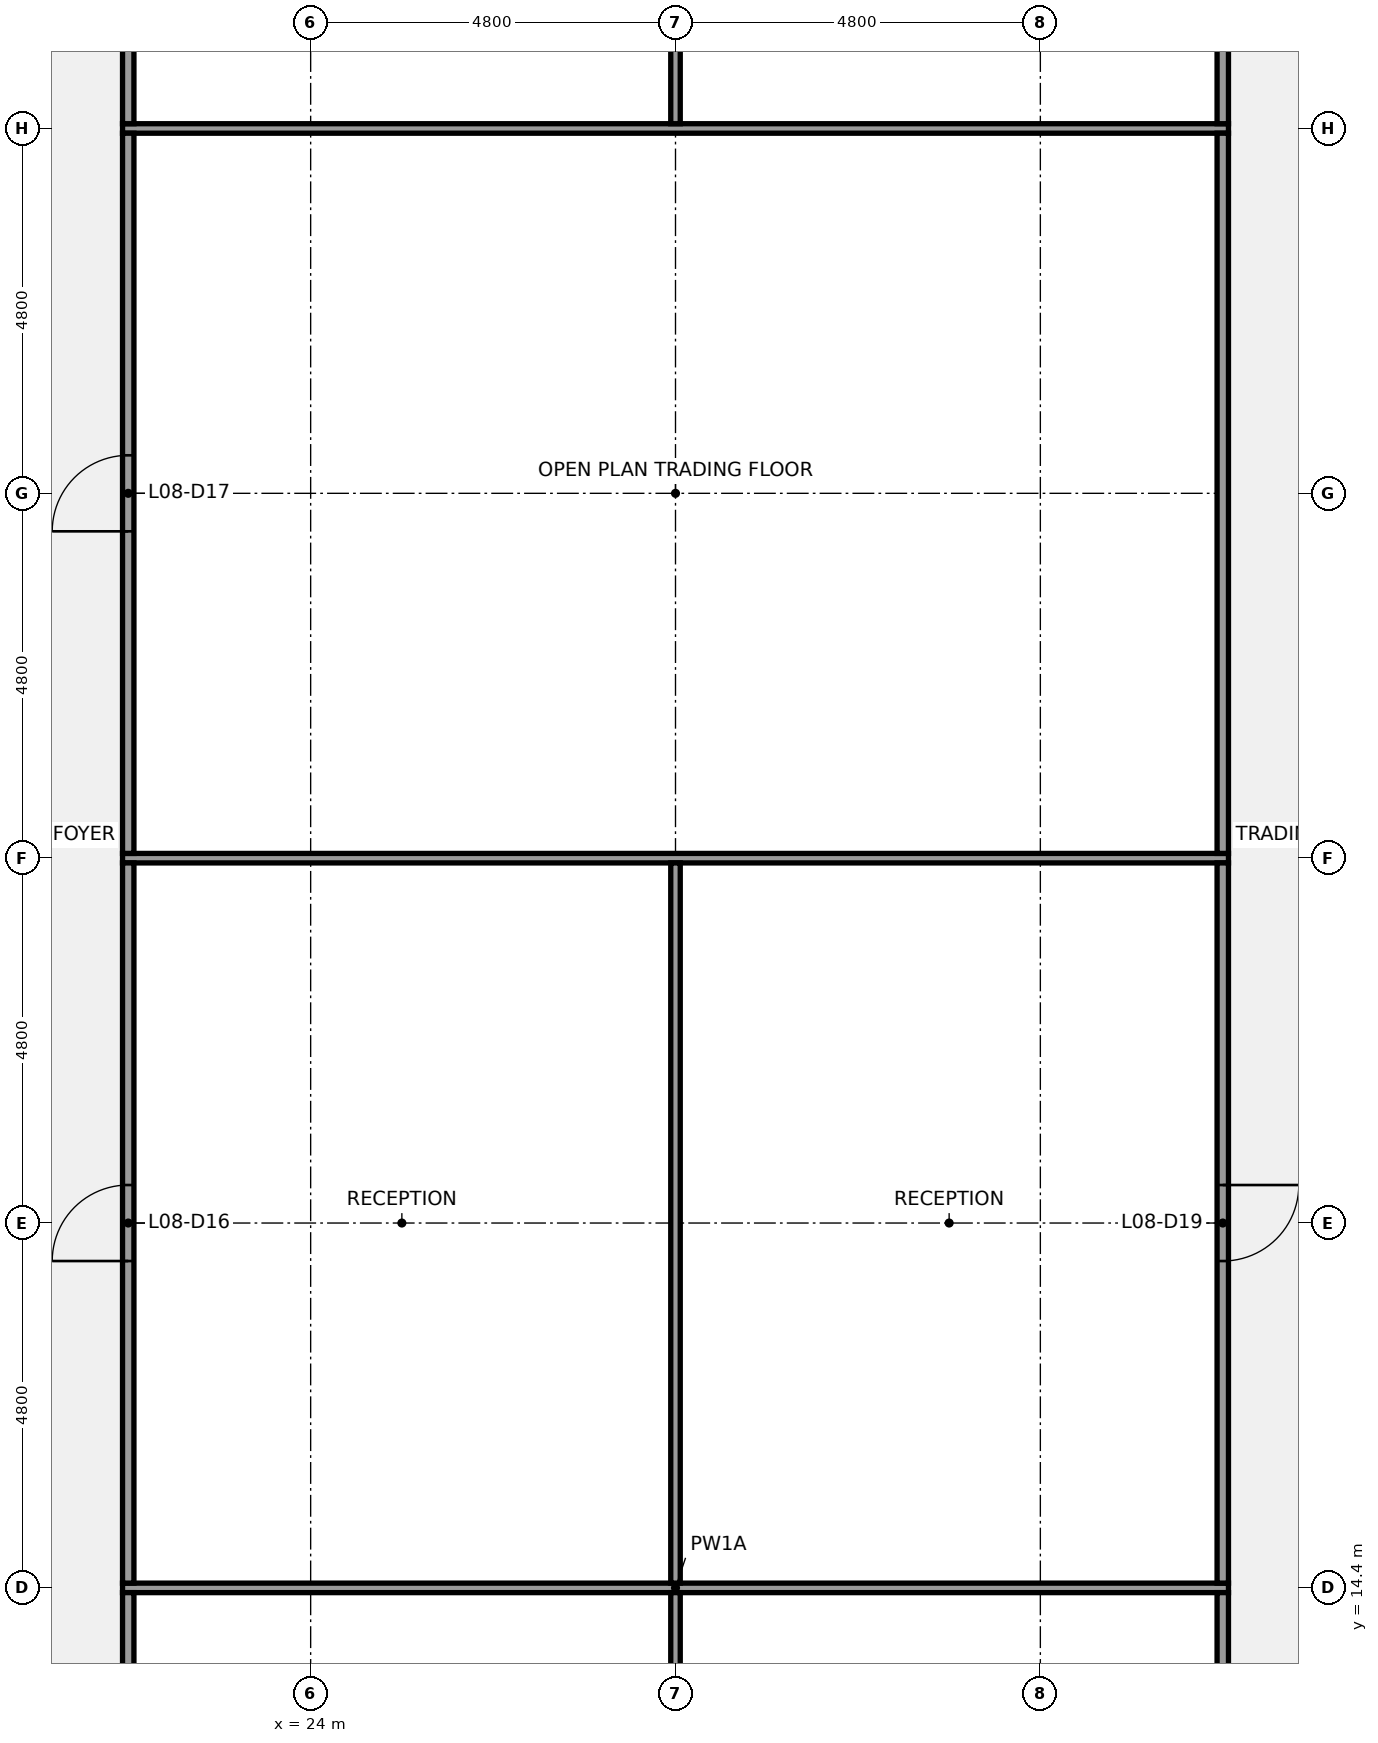
"""IFC4 building model, lengths in metres.
Left out: names, types, materials, properties, quantities, classifications, styles, units other than length and angle.
Written with IfcOpenShell. Run it as: python <this file> out.ifc"""

import sys

from ifc_helpers import new_model, si_unit, direction, frame, frame_2d, origin, place, context, subcontext, project, spatial, rectangle, extrude, element, fill, save


model = new_model("IFC4")
c1 = context("Model", 3, precision=1e-05, world=origin(), true_north=direction((0.0, 1.0)))
c2 = subcontext(c1, "Body", "Model", "MODEL_VIEW")
j1 = project(units=[si_unit("LENGTHUNIT", "METRE"), si_unit("PLANEANGLEUNIT", "RADIAN")], contexts=[c1])
p1 = place(None, origin())
s1 = spatial("IfcSite", under=j1, at=p1, CompositionType="ELEMENT")
p2 = place(p1, origin())
s2 = spatial("IfcBuilding", under=s1, at=p2, CompositionType="ELEMENT")
p3 = place(p2, frame((0.0, 0.0, 43.0)))
s3 = spatial("IfcBuildingStorey", under=s2, at=p3, CompositionType="ELEMENT", Elevation=43.0)
for number, where, z_axis, x_axis in (
    (1, (21.525, 14.4, 0.0), (0.0, 0.0, 1.0), (1.0, 0.0, 0.0)),
    (2, (21.525, 24.0, 0.0), (0.0, 0.0, 1.0), (1.0, 0.0, 0.0)),
    (3, (21.525, 33.6, 0.0), (0.0, 0.0, 1.0), (1.0, 0.0, 0.0)),
):
    element("IfcWall", number, at=place(p3, frame(where, z_axis=z_axis, x_axis=x_axis)), inside=s3, PredefinedType="PARTITIONING", context=c2, shape_type="SweptSolid", body=[
        extrude(rectangle(XDim=14.55, YDim=0.125, at=frame_2d((7.275, 0.0))), origin(), (0.0, 0.0, 1.0), 2.849),
    ])
p4 = place(p3, frame((21.6, 7.275, 0.0), z_axis=(0.0, 0.0, 1.0), x_axis=(0.0, 1.0, 0.0)))
e4 = element("IfcWall", 4, at=p4, inside=s3, PredefinedType="PARTITIONING", context=c2, shape_type="SweptSolid", body=[
    extrude(rectangle(XDim=7.062, YDim=0.15, at=frame_2d((3.531, 0.0))), origin(), (0.0, 0.0, 1.0), 2.849),
])
p5 = place(p4, frame((3.031, 0.0, 0.0)))
e5 = element("IfcOpeningElement", 5, at=p5, cuts=e4, PredefinedType="OPENING", context=c2, shape_type="SweptSolid", body=[
    extrude(rectangle(XDim=1.0, YDim=2.1, at=frame_2d((0.5, 1.05))), frame((0.0, 0.085, 0.0), z_axis=(0.0, -1.0, 0.0), x_axis=(1.0, 0.0, 0.0)), (0.0, 0.0, 1.0), 0.17),
])
p6 = place(p3, frame((21.6, 14.462, 0.0), z_axis=(0.0, 0.0, 1.0), x_axis=(0.0, 1.0, 0.0)))
e6 = element("IfcWall", 6, at=p6, inside=s3, PredefinedType="PARTITIONING", context=c2, shape_type="SweptSolid", body=[
    extrude(rectangle(XDim=9.475, YDim=0.15, at=frame_2d((4.738, 0.0))), origin(), (0.0, 0.0, 1.0), 2.849),
])
p7 = place(p6, frame((4.238, 0.0, 0.0)))
e7 = element("IfcOpeningElement", 7, at=p7, cuts=e6, PredefinedType="OPENING", context=c2, shape_type="SweptSolid", body=[
    extrude(rectangle(XDim=1.0, YDim=2.1, at=frame_2d((0.5, 1.05))), frame((0.0, 0.085, 0.0), z_axis=(0.0, -1.0, 0.0), x_axis=(1.0, 0.0, 0.0)), (0.0, 0.0, 1.0), 0.17),
])
p8 = place(p3, frame((21.6, 24.062, 0.0), z_axis=(0.0, 0.0, 1.0), x_axis=(0.0, 1.0, 0.0)))
e8 = element("IfcWall", 8, at=p8, inside=s3, PredefinedType="PARTITIONING", context=c2, shape_type="SweptSolid", body=[
    extrude(rectangle(XDim=9.475, YDim=0.15, at=frame_2d((4.738, 0.0))), origin(), (0.0, 0.0, 1.0), 2.849),
])
p9 = place(p8, frame((4.238, 0.0, 0.0)))
e9 = element("IfcOpeningElement", 9, at=p9, cuts=e8, PredefinedType="OPENING", context=c2, shape_type="SweptSolid", body=[
    extrude(rectangle(XDim=1.0, YDim=2.1, at=frame_2d((0.5, 1.05))), frame((0.0, 0.085, 0.0), z_axis=(0.0, -1.0, 0.0), x_axis=(1.0, 0.0, 0.0)), (0.0, 0.0, 1.0), 0.17),
])
p10 = place(p3, frame((21.6, 33.663, 0.0), z_axis=(0.0, 0.0, 1.0), x_axis=(0.0, 1.0, 0.0)))
e10 = element("IfcWall", 10, at=p10, inside=s3, PredefinedType="PARTITIONING", context=c2, shape_type="SweptSolid", body=[
    extrude(rectangle(XDim=7.062, YDim=0.15, at=frame_2d((3.531, 0.0))), origin(), (0.0, 0.0, 1.0), 2.849),
])
p11 = place(p3, frame((28.8, 7.275, 0.0), z_axis=(0.0, 0.0, 1.0), x_axis=(0.0, 1.0, 0.0)))
e11 = element("IfcWall", 11, at=p11, inside=s3, PredefinedType="PARTITIONING", context=c2, shape_type="SweptSolid", body=[
    extrude(rectangle(XDim=7.062, YDim=0.125, at=frame_2d((3.531, 0.0))), origin(), (0.0, 0.0, 1.0), 2.849),
])
p12 = place(p3, frame((28.8, 14.462, 0.0), z_axis=(0.0, 0.0, 1.0), x_axis=(0.0, 1.0, 0.0)))
e12 = element("IfcWall", 12, at=p12, inside=s3, PredefinedType="PARTITIONING", context=c2, shape_type="SweptSolid", body=[
    extrude(rectangle(XDim=9.475, YDim=0.125, at=frame_2d((4.738, 0.0))), origin(), (0.0, 0.0, 1.0), 2.849),
])
p13 = place(p3, frame((28.8, 33.663, 0.0), z_axis=(0.0, 0.0, 1.0), x_axis=(0.0, 1.0, 0.0)))
e13 = element("IfcWall", 13, at=p13, inside=s3, PredefinedType="PARTITIONING", context=c2, shape_type="SweptSolid", body=[
    extrude(rectangle(XDim=7.062, YDim=0.125, at=frame_2d((3.531, 0.0))), origin(), (0.0, 0.0, 1.0), 2.849),
])
p14 = place(p3, frame((36.0, 7.275, 0.0), z_axis=(0.0, 0.0, 1.0), x_axis=(0.0, 1.0, 0.0)))
e14 = element("IfcWall", 14, at=p14, inside=s3, PredefinedType="PARTITIONING", context=c2, shape_type="SweptSolid", body=[
    extrude(rectangle(XDim=7.062, YDim=0.15, at=frame_2d((3.531, 0.0))), origin(), (0.0, 0.0, 1.0), 2.849),
])
p15 = place(p14, frame((3.031, 0.0, 0.0)))
e15 = element("IfcOpeningElement", 15, at=p15, cuts=e14, PredefinedType="OPENING", context=c2, shape_type="SweptSolid", body=[
    extrude(rectangle(XDim=1.0, YDim=2.1, at=frame_2d((0.5, 1.05))), frame((0.0, 0.085, 0.0), z_axis=(0.0, -1.0, 0.0), x_axis=(1.0, 0.0, 0.0)), (0.0, 0.0, 1.0), 0.17),
])
p16 = place(p3, frame((36.0, 14.462, 0.0), z_axis=(0.0, 0.0, 1.0), x_axis=(0.0, 1.0, 0.0)))
e16 = element("IfcWall", 16, at=p16, inside=s3, PredefinedType="PARTITIONING", context=c2, shape_type="SweptSolid", body=[
    extrude(rectangle(XDim=9.475, YDim=0.15, at=frame_2d((4.738, 0.0))), origin(), (0.0, 0.0, 1.0), 2.849),
])
p17 = place(p16, frame((4.238, 0.0, 0.0)))
e17 = element("IfcOpeningElement", 17, at=p17, cuts=e16, PredefinedType="OPENING", context=c2, shape_type="SweptSolid", body=[
    extrude(rectangle(XDim=1.0, YDim=2.1, at=frame_2d((0.5, 1.05))), frame((0.0, 0.085, 0.0), z_axis=(0.0, -1.0, 0.0), x_axis=(1.0, 0.0, 0.0)), (0.0, 0.0, 1.0), 0.17),
])
p18 = place(p3, frame((36.0, 24.062, 0.0), z_axis=(0.0, 0.0, 1.0), x_axis=(0.0, 1.0, 0.0)))
e18 = element("IfcWall", 18, at=p18, inside=s3, PredefinedType="PARTITIONING", context=c2, shape_type="SweptSolid", body=[
    extrude(rectangle(XDim=9.475, YDim=0.15, at=frame_2d((4.738, 0.0))), origin(), (0.0, 0.0, 1.0), 2.849),
])
p19 = place(p3, frame((36.0, 33.663, 0.0), z_axis=(0.0, 0.0, 1.0), x_axis=(0.0, 1.0, 0.0)))
e19 = element("IfcWall", 19, at=p19, inside=s3, PredefinedType="PARTITIONING", context=c2, shape_type="SweptSolid", body=[
    extrude(rectangle(XDim=7.062, YDim=0.15, at=frame_2d((3.531, 0.0))), origin(), (0.0, 0.0, 1.0), 2.849),
])
p20 = place(p7, origin())
e20 = element("IfcDoor", 20, at=p20, inside=s3, OperationType="SINGLE_SWING_LEFT", PredefinedType="DOOR", context=c2, shape_type="SweptSolid", body=[
    extrude(rectangle(XDim=1.0, YDim=2.1, at=frame_2d((0.5, 1.05))), frame((0.0, 0.025, 0.0), z_axis=(0.0, -1.0, 0.0), x_axis=(1.0, 0.0, 0.0)), (0.0, 0.0, 1.0), 0.05),
])
fill(e7, e20)
p21 = place(p9, origin())
e21 = element("IfcDoor", 21, at=p21, inside=s3, OperationType="SINGLE_SWING_LEFT", PredefinedType="DOOR", context=c2, shape_type="SweptSolid", body=[
    extrude(rectangle(XDim=1.0, YDim=2.1, at=frame_2d((0.5, 1.05))), frame((0.0, 0.025, 0.0), z_axis=(0.0, -1.0, 0.0), x_axis=(1.0, 0.0, 0.0)), (0.0, 0.0, 1.0), 0.05),
])
fill(e9, e21)
p22 = place(p17, origin())
e22 = element("IfcDoor", 22, at=p22, inside=s3, OperationType="SINGLE_SWING_RIGHT", PredefinedType="DOOR", context=c2, shape_type="SweptSolid", body=[
    extrude(rectangle(XDim=1.0, YDim=2.1, at=frame_2d((0.5, 1.05))), frame((0.0, 0.025, 0.0), z_axis=(0.0, -1.0, 0.0), x_axis=(1.0, 0.0, 0.0)), (0.0, 0.0, 1.0), 0.05),
])
fill(e17, e22)
save(model, sys.argv[1])
